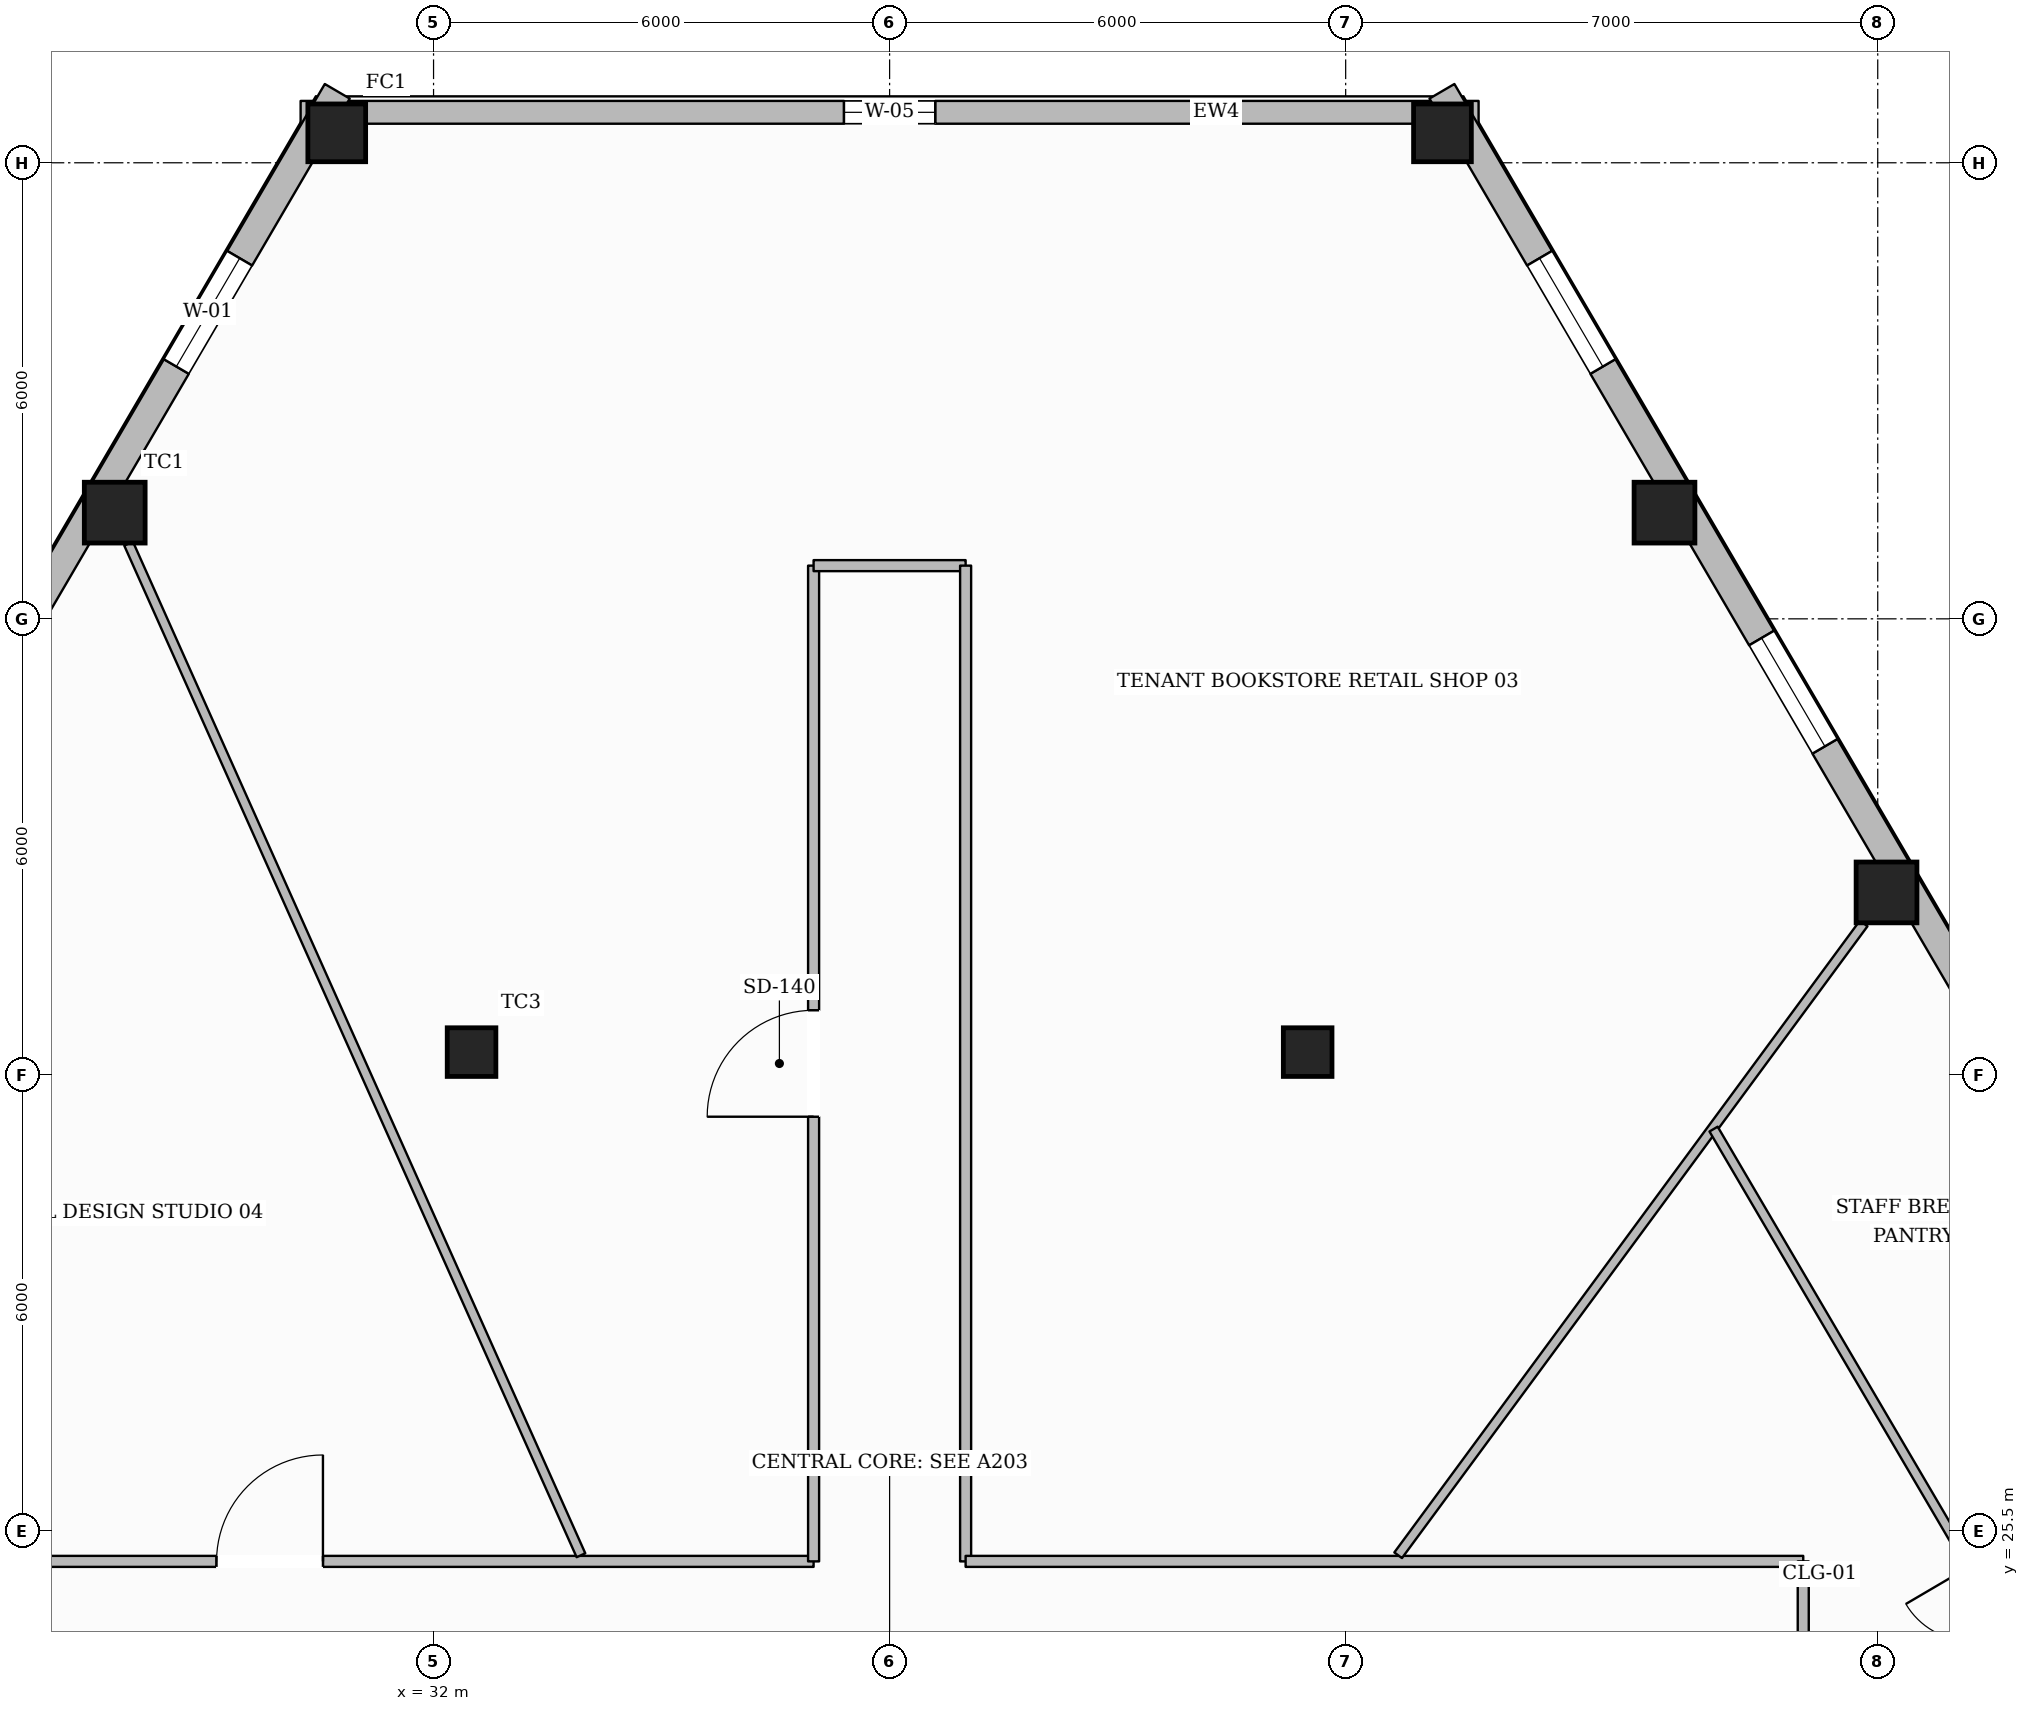
"""IFC4 building model, lengths in metres.
Left out: names, types, materials, properties, quantities, classifications, styles, units other than length and angle.
Written with IfcOpenShell. Run it as: python <this file> out.ifc"""

import sys

from ifc_helpers import new_model, si_unit, direction, frame, frame_2d, origin, origin_2d, place, context, subcontext, project, spatial, rectangle, hollow_rectangle, extrude, element, fill, save


model = new_model("IFC4")
c1 = context("Model", 3, precision=1e-05, world=origin(), true_north=direction((0.0, 1.0)))
c2 = subcontext(c1, "Body", "Model", "MODEL_VIEW")
j1 = project(units=[si_unit("LENGTHUNIT", "METRE"), si_unit("PLANEANGLEUNIT", "RADIAN")], contexts=[c1])
p1 = place(None, origin())
s1 = spatial("IfcSite", under=j1, at=p1, CompositionType="ELEMENT")
p2 = place(p1, origin())
s2 = spatial("IfcBuilding", under=s1, at=p2, CompositionType="ELEMENT")
p3 = place(p2, frame((0.0, 0.0, 59.9)))
s3 = spatial("IfcBuildingStorey", under=s2, at=p3, CompositionType="ELEMENT", Elevation=59.9)
p4 = place(p3, frame((30.727, 43.894, 0.0), z_axis=(0.0, 0.0, 1.0), x_axis=(1.0, 0.0, 0.0)))
e1 = element("IfcColumn", 1, at=p4, inside=s3, PredefinedType="COLUMN", context=c2, shape_type="SweptSolid", body=[
    extrude(hollow_rectangle(XDim=0.76, YDim=0.76, WallThickness=0.035, at=origin_2d()), origin(), (0.0, 0.0, 1.0), 3.59),
])
for number, where, z_axis, x_axis in (
    (2, (27.805, 38.897, 0.0), (0.0, 0.0, 1.0), (1.0, 0.0, 0.0)),
    (3, (51.115, 33.901, 0.0), (0.0, 0.0, 1.0), (1.0, 0.0, 0.0)),
    (4, (48.195, 38.897, 0.0), (0.0, 0.0, 1.0), (1.0, 0.0, 0.0)),
):
    element("IfcColumn", number, at=place(p3, frame(where, z_axis=z_axis, x_axis=x_axis)), inside=s3, PredefinedType="COLUMN", context=c2, shape_type="SweptSolid", body=[
        extrude(hollow_rectangle(XDim=0.8, YDim=0.8, WallThickness=0.036, at=origin_2d()), origin(), (0.0, 0.0, 1.0), 3.59),
    ])
p5 = place(p3, frame((45.273, 43.894, 0.0), z_axis=(0.0, 0.0, 1.0), x_axis=(1.0, 0.0, 0.0)))
e5 = element("IfcColumn", 5, at=p5, inside=s3, PredefinedType="COLUMN", context=c2, shape_type="SweptSolid", body=[
    extrude(hollow_rectangle(XDim=0.76, YDim=0.76, WallThickness=0.035, at=origin_2d()), origin(), (0.0, 0.0, 1.0), 3.59),
])
for number, where, z_axis, x_axis in (
    (6, (32.5, 31.8, 0.0), (0.0, 0.0, 1.0), (1.0, 0.0, 0.0)),
    (7, (43.5, 31.8, 0.0), (0.0, 0.0, 1.0), (1.0, 0.0, 0.0)),
):
    element("IfcColumn", number, at=place(p3, frame(where, z_axis=z_axis, x_axis=x_axis)), inside=s3, PredefinedType="COLUMN", context=c2, shape_type="SweptSolid", body=[
        extrude(hollow_rectangle(XDim=0.64, YDim=0.64, WallThickness=0.028, at=origin_2d()), origin(), (0.0, 0.0, 1.0), 3.59),
    ])
p6 = place(p3, frame((30.251, 44.164, 0.0), z_axis=(0.0, 0.0, 1.0), x_axis=(1.0, 0.0, 0.0)))
e8 = element("IfcWall", 8, at=p6, inside=s3, PredefinedType="STANDARD", context=c2, shape_type="SweptSolid", body=[
    extrude(rectangle(XDim=15.498, YDim=0.3, at=frame_2d((7.749, 0.0))), origin(), (0.0, 0.0, 1.0), 2.97),
])
p7 = place(p6, frame((7.149, 0.0, 0.65)))
e9 = element("IfcOpeningElement", 9, at=p7, cuts=e8, PredefinedType="OPENING", context=c2, shape_type="SweptSolid", body=[
    extrude(rectangle(XDim=1.2, YDim=1.7, at=frame_2d((0.6, 0.85))), frame((0.0, 0.16, 0.0), z_axis=(0.0, -1.0, 0.0), x_axis=(1.0, 0.0, 0.0)), (0.0, 0.0, 1.0), 0.32),
])
p8 = place(p3, frame((12.724, 13.636, 0.0), z_axis=(0.0, 0.0, 1.0), x_axis=(0.504702471056, 0.863293354376, 0.0)))
e10 = element("IfcWall", 10, at=p8, inside=s3, PredefinedType="STANDARD", context=c2, shape_type="SweptSolid", body=[
    extrude(rectangle(XDim=35.682, YDim=0.38, at=frame_2d((17.841, 0.0))), origin(), (0.0, 0.0, 1.0), 2.97),
])
p9 = place(p8, frame((31.488, 0.0, 0.65)))
e11 = element("IfcOpeningElement", 11, at=p9, cuts=e10, PredefinedType="OPENING", context=c2, shape_type="SweptSolid", body=[
    extrude(rectangle(XDim=1.65, YDim=1.75, at=frame_2d((0.825, 0.875))), frame((0.0, 0.2, 0.0), z_axis=(0.0, -1.0, 0.0), x_axis=(1.0, 0.0, 0.0)), (0.0, 0.0, 1.0), 0.4),
])
p10 = place(p8, frame((25.701, 0.0, 0.65)))
e12 = element("IfcOpeningElement", 12, at=p10, cuts=e10, PredefinedType="OPENING", context=c2, shape_type="SweptSolid", body=[
    extrude(rectangle(XDim=1.65, YDim=1.75, at=frame_2d((0.825, 0.875))), frame((0.0, 0.2, 0.0), z_axis=(0.0, -1.0, 0.0), x_axis=(1.0, 0.0, 0.0)), (0.0, 0.0, 1.0), 0.4),
])
p11 = place(p8, frame((14.125, 0.0, 0.65)))
e13 = element("IfcOpeningElement", 13, at=p11, cuts=e10, PredefinedType="OPENING", context=c2, shape_type="SweptSolid", body=[
    extrude(rectangle(XDim=1.65, YDim=1.75, at=frame_2d((0.825, 0.875))), frame((0.0, 0.2, 0.0), z_axis=(0.0, -1.0, 0.0), x_axis=(1.0, 0.0, 0.0)), (0.0, 0.0, 1.0), 0.4),
])
p12 = place(p8, frame((8.337, 0.0, 0.65)))
e14 = element("IfcOpeningElement", 14, at=p12, cuts=e10, PredefinedType="OPENING", context=c2, shape_type="SweptSolid", body=[
    extrude(rectangle(XDim=1.65, YDim=1.75, at=frame_2d((0.825, 0.875))), frame((0.0, 0.2, 0.0), z_axis=(0.0, -1.0, 0.0), x_axis=(1.0, 0.0, 0.0)), (0.0, 0.0, 1.0), 0.4),
])
p13 = place(p8, frame((2.549, 0.0, 0.65)))
e15 = element("IfcOpeningElement", 15, at=p13, cuts=e10, PredefinedType="OPENING", context=c2, shape_type="SweptSolid", body=[
    extrude(rectangle(XDim=1.65, YDim=1.75, at=frame_2d((0.825, 0.875))), frame((0.0, 0.2, 0.0), z_axis=(0.0, -1.0, 0.0), x_axis=(1.0, 0.0, 0.0)), (0.0, 0.0, 1.0), 0.4),
])
p14 = place(p3, frame((45.267, 44.44, 0.0), z_axis=(0.0, 0.0, 1.0), x_axis=(0.504702471056, -0.863293354376, 0.0)))
e16 = element("IfcWall", 16, at=p14, inside=s3, PredefinedType="STANDARD", context=c2, shape_type="SweptSolid", body=[
    extrude(rectangle(XDim=35.682, YDim=0.38, at=frame_2d((17.841, 0.0))), origin(), (0.0, 0.0, 1.0), 2.97),
])
p15 = place(p14, frame((31.483, 0.0, 0.65)))
e17 = element("IfcOpeningElement", 17, at=p15, cuts=e16, PredefinedType="OPENING", context=c2, shape_type="SweptSolid", body=[
    extrude(rectangle(XDim=1.65, YDim=1.75, at=frame_2d((0.825, 0.875))), frame((0.0, 0.2, 0.0), z_axis=(0.0, -1.0, 0.0), x_axis=(1.0, 0.0, 0.0)), (0.0, 0.0, 1.0), 0.4),
])
p16 = place(p14, frame((25.696, 0.0, 0.65)))
e18 = element("IfcOpeningElement", 18, at=p16, cuts=e16, PredefinedType="OPENING", context=c2, shape_type="SweptSolid", body=[
    extrude(rectangle(XDim=1.65, YDim=1.75, at=frame_2d((0.825, 0.875))), frame((0.0, 0.2, 0.0), z_axis=(0.0, -1.0, 0.0), x_axis=(1.0, 0.0, 0.0)), (0.0, 0.0, 1.0), 0.4),
])
p17 = place(p14, frame((14.12, 0.0, 0.65)))
e19 = element("IfcOpeningElement", 19, at=p17, cuts=e16, PredefinedType="OPENING", context=c2, shape_type="SweptSolid", body=[
    extrude(rectangle(XDim=1.65, YDim=1.75, at=frame_2d((0.825, 0.875))), frame((0.0, 0.2, 0.0), z_axis=(0.0, -1.0, 0.0), x_axis=(1.0, 0.0, 0.0)), (0.0, 0.0, 1.0), 0.4),
])
p18 = place(p14, frame((8.332, 0.0, 0.65)))
e20 = element("IfcOpeningElement", 20, at=p18, cuts=e16, PredefinedType="OPENING", context=c2, shape_type="SweptSolid", body=[
    extrude(rectangle(XDim=1.65, YDim=1.75, at=frame_2d((0.825, 0.875))), frame((0.0, 0.2, 0.0), z_axis=(0.0, -1.0, 0.0), x_axis=(1.0, 0.0, 0.0)), (0.0, 0.0, 1.0), 0.4),
])
p19 = place(p14, frame((2.544, 0.0, 0.65)))
e21 = element("IfcOpeningElement", 21, at=p19, cuts=e16, PredefinedType="OPENING", context=c2, shape_type="SweptSolid", body=[
    extrude(rectangle(XDim=1.65, YDim=1.75, at=frame_2d((0.825, 0.875))), frame((0.0, 0.2, 0.0), z_axis=(0.0, -1.0, 0.0), x_axis=(1.0, 0.0, 0.0)), (0.0, 0.0, 1.0), 0.4),
])
p20 = place(p3, frame((25.98, 25.1, 0.0), z_axis=(0.0, 0.0, 1.0), x_axis=(1.0, 0.0, 0.0)))
e22 = element("IfcWall", 22, at=p20, inside=s3, PredefinedType="PARTITIONING", context=c2, shape_type="SweptSolid", body=[
    extrude(rectangle(XDim=11.02, YDim=0.145, at=frame_2d((5.51, 0.0))), origin(), (0.0, 0.0, 1.0), 3.59),
])
p21 = place(p20, frame((3.165, 0.0, 0.0)))
e23 = element("IfcOpeningElement", 23, at=p21, cuts=e22, PredefinedType="OPENING", context=c2, shape_type="SweptSolid", body=[
    extrude(rectangle(XDim=1.4, YDim=2.2, at=frame_2d((0.7, 1.1))), frame((0.0, 0.083, 0.0), z_axis=(0.0, -1.0, 0.0), x_axis=(1.0, 0.0, 0.0)), (0.0, 0.0, 1.0), 0.165),
])
p22 = place(p3, frame((37.0, 25.1, 0.0), z_axis=(0.0, 0.0, 1.0), x_axis=(0.0, 1.0, 0.0)))
e24 = element("IfcWall", 24, at=p22, inside=s3, PredefinedType="PARTITIONING", context=c2, shape_type="SweptSolid", body=[
    extrude(rectangle(XDim=13.1, YDim=0.145, at=frame_2d((6.55, 0.0))), origin(), (0.0, 0.0, 1.0), 3.59),
])
p23 = place(p22, frame((5.85, 0.0, 0.0)))
e25 = element("IfcOpeningElement", 25, at=p23, cuts=e24, PredefinedType="OPENING", context=c2, shape_type="SweptSolid", body=[
    extrude(rectangle(XDim=1.4, YDim=2.2, at=frame_2d((0.7, 1.1))), frame((0.0, 0.083, 0.0), z_axis=(0.0, -1.0, 0.0), x_axis=(1.0, 0.0, 0.0)), (0.0, 0.0, 1.0), 0.165),
])
p24 = place(p3, frame((37.0, 38.2, 0.0), z_axis=(0.0, 0.0, 1.0), x_axis=(1.0, 0.0, 0.0)))
e26 = element("IfcWall", 26, at=p24, inside=s3, PredefinedType="PARTITIONING", context=c2, shape_type="SweptSolid", body=[
    extrude(rectangle(XDim=2.0, YDim=0.145, at=frame_2d((1.0, 0.0))), origin(), (0.0, 0.0, 1.0), 3.59),
])
p25 = place(p3, frame((39.0, 38.2, 0.0), z_axis=(0.0, 0.0, 1.0), x_axis=(0.0, -1.0, 0.0)))
e27 = element("IfcWall", 27, at=p25, inside=s3, PredefinedType="PARTITIONING", context=c2, shape_type="SweptSolid", body=[
    extrude(rectangle(XDim=13.1, YDim=0.145, at=frame_2d((6.55, 0.0))), origin(), (0.0, 0.0, 1.0), 3.59),
])
p26 = place(p3, frame((39.0, 25.1, 0.0), z_axis=(0.0, 0.0, 1.0), x_axis=(1.0, 0.0, 0.0)))
e28 = element("IfcWall", 28, at=p26, inside=s3, PredefinedType="PARTITIONING", context=c2, shape_type="SweptSolid", body=[
    extrude(rectangle(XDim=11.02, YDim=0.145, at=frame_2d((5.51, 0.0))), origin(), (0.0, 0.0, 1.0), 3.59),
])
p27 = place(p3, frame((50.02, 25.1, 0.0), z_axis=(0.0, 0.0, 1.0), x_axis=(0.0, -1.0, 0.0)))
e29 = element("IfcWall", 29, at=p27, inside=s3, PredefinedType="PARTITIONING", context=c2, shape_type="SweptSolid", body=[
    extrude(rectangle(XDim=16.0, YDim=0.145, at=frame_2d((8.0, 0.0))), origin(), (0.0, 0.0, 1.0), 3.278),
])
p28 = place(p27, frame((3.318, 0.0, 0.0)))
e30 = element("IfcOpeningElement", 30, at=p28, cuts=e29, PredefinedType="OPENING", context=c2, shape_type="SweptSolid", body=[
    extrude(rectangle(XDim=0.98, YDim=2.15, at=frame_2d((0.49, 1.075))), frame((0.0, 0.083, 0.0), z_axis=(0.0, -1.0, 0.0), x_axis=(1.0, 0.0, 0.0)), (0.0, 0.0, 1.0), 0.165),
])
p29 = place(p3, frame((44.69, 25.18, 0.0), z_axis=(0.0, 0.0, 1.0), x_axis=(0.5931796797, 0.805070101042, 0.0)))
e31 = element("IfcWall", 31, at=p29, inside=s3, PredefinedType="PARTITIONING", context=c2, shape_type="SweptSolid", body=[
    extrude(rectangle(XDim=10.325, YDim=0.125, at=frame_2d((5.163, 0.0))), origin(), (0.0, 0.0, 1.0), 3.057),
])
p30 = place(p3, frame((33.939, 25.18, 0.0), z_axis=(0.0, 0.0, 1.0), x_axis=(-0.408221011752, 0.912883128097, 0.0)))
e32 = element("IfcWall", 32, at=p30, inside=s3, PredefinedType="PARTITIONING", context=c2, shape_type="SweptSolid", body=[
    extrude(rectangle(XDim=14.579, YDim=0.125, at=frame_2d((7.29, 0.0))), origin(), (0.0, 0.0, 1.0), 3.057),
])
p31 = place(p3, frame((56.086, 18.439, 0.0), z_axis=(0.0, 0.0, 1.0), x_axis=(-0.506083112793, 0.862484714616, 0.0)))
e33 = element("IfcWall", 33, at=p31, inside=s3, PredefinedType="PARTITIONING", context=c2, shape_type="SweptSolid", body=[
    extrude(rectangle(XDim=14.318, YDim=0.125, at=frame_2d((7.159, 0.0))), origin(), (0.0, 0.0, 1.0), 3.59),
])
p32 = place(p31, frame((6.669, 0.0, 0.0)))
e34 = element("IfcOpeningElement", 34, at=p32, cuts=e33, PredefinedType="OPENING", context=c2, shape_type="SweptSolid", body=[
    extrude(rectangle(XDim=0.98, YDim=2.15, at=frame_2d((0.49, 1.075))), frame((0.0, 0.073, 0.0), z_axis=(0.0, -1.0, 0.0), x_axis=(1.0, 0.0, 0.0)), (0.0, 0.0, 1.0), 0.145),
])
p33 = place(p9, origin())
e35 = element("IfcWindow", 35, at=p33, inside=s3, PartitioningType="SINGLE_PANEL", PredefinedType="WINDOW", context=c2, shape_type="SweptSolid", body=[
    extrude(rectangle(XDim=1.65, YDim=1.75, at=frame_2d((0.825, 0.875))), frame((0.0, 0.03, 0.0), z_axis=(0.0, -1.0, 0.0), x_axis=(1.0, 0.0, 0.0)), (0.0, 0.0, 1.0), 0.06),
])
fill(e11, e35)
p34 = place(p18, origin())
e36 = element("IfcWindow", 36, at=p34, inside=s3, PartitioningType="SINGLE_PANEL", PredefinedType="WINDOW", context=c2, shape_type="SweptSolid", body=[
    extrude(rectangle(XDim=1.65, YDim=1.75, at=frame_2d((0.825, 0.875))), frame((0.0, 0.03, 0.0), z_axis=(0.0, -1.0, 0.0), x_axis=(1.0, 0.0, 0.0)), (0.0, 0.0, 1.0), 0.06),
])
fill(e20, e36)
p35 = place(p19, origin())
e37 = element("IfcWindow", 37, at=p35, inside=s3, PartitioningType="SINGLE_PANEL", PredefinedType="WINDOW", context=c2, shape_type="SweptSolid", body=[
    extrude(rectangle(XDim=1.65, YDim=1.75, at=frame_2d((0.825, 0.875))), frame((0.0, 0.03, 0.0), z_axis=(0.0, -1.0, 0.0), x_axis=(1.0, 0.0, 0.0)), (0.0, 0.0, 1.0), 0.06),
])
fill(e21, e37)
p36 = place(p7, origin())
e38 = element("IfcWindow", 38, at=p36, inside=s3, PartitioningType="SINGLE_PANEL", PredefinedType="WINDOW", context=c2, shape_type="SweptSolid", body=[
    extrude(rectangle(XDim=1.2, YDim=1.7, at=frame_2d((0.6, 0.85))), frame((0.0, 0.03, 0.0), z_axis=(0.0, -1.0, 0.0), x_axis=(1.0, 0.0, 0.0)), (0.0, 0.0, 1.0), 0.06),
])
fill(e9, e38)
p37 = place(p23, origin())
e39 = element("IfcDoor", 39, at=p37, inside=s3, OperationType="SINGLE_SWING_LEFT", PredefinedType="DOOR", context=c2, shape_type="SweptSolid", body=[
    extrude(rectangle(XDim=1.4, YDim=2.2, at=frame_2d((0.7, 1.1))), frame((0.0, 0.025, 0.0), z_axis=(0.0, -1.0, 0.0), x_axis=(1.0, 0.0, 0.0)), (0.0, 0.0, 1.0), 0.05),
])
fill(e25, e39)
p38 = place(p21, origin())
e40 = element("IfcDoor", 40, at=p38, inside=s3, OperationType="SINGLE_SWING_RIGHT", PredefinedType="DOOR", context=c2, shape_type="SweptSolid", body=[
    extrude(rectangle(XDim=1.4, YDim=2.2, at=frame_2d((0.7, 1.1))), frame((0.0, 0.025, 0.0), z_axis=(0.0, -1.0, 0.0), x_axis=(1.0, 0.0, 0.0)), (0.0, 0.0, 1.0), 0.05),
])
fill(e23, e40)
save(model, sys.argv[1])
